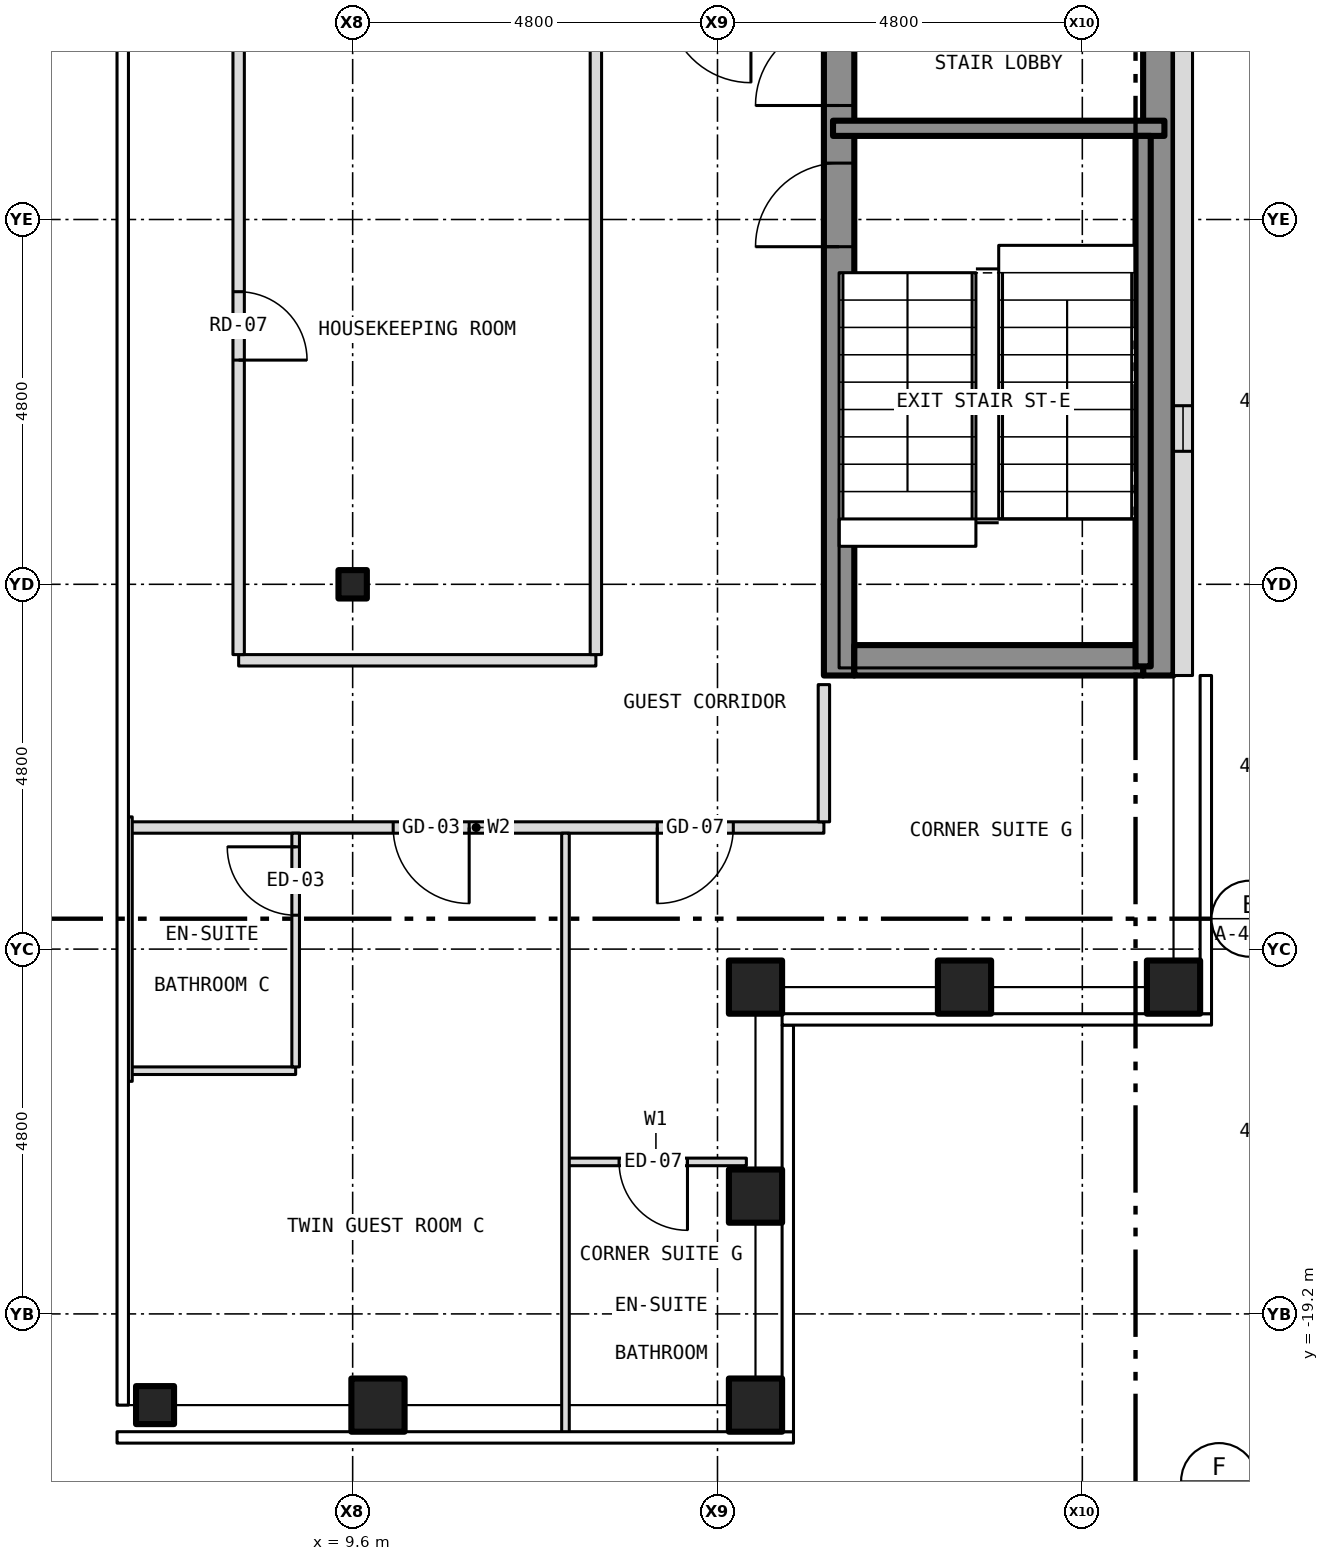
"""IFC4 building model, lengths in metres.
Left out: names, types, materials, properties, quantities, classifications, styles, units other than length and angle.
Written with IfcOpenShell. Run it as: python <this file> out.ifc"""

import sys

from ifc_helpers import new_model, si_unit, direction, frame, frame_2d, origin, origin_2d, place, context, subcontext, project, spatial, rectangle, hollow_rectangle, i_section, extrude, element, fill, save


model = new_model("IFC4")
c1 = context("Model", 3, precision=1e-05, world=origin(), true_north=direction((0.0, 1.0)))
c2 = subcontext(c1, "Body", "Model", "MODEL_VIEW")
j1 = project(units=[si_unit("LENGTHUNIT", "METRE"), si_unit("PLANEANGLEUNIT", "RADIAN")], contexts=[c1])
p1 = place(None, origin())
s1 = spatial("IfcSite", under=j1, at=p1, CompositionType="ELEMENT")
p2 = place(p1, origin())
s2 = spatial("IfcBuilding", under=s1, at=p2, CompositionType="ELEMENT")
p3 = place(p2, frame((0.0, 0.0, 226.0)))
s3 = spatial("IfcBuildingStorey", under=s2, at=p3, CompositionType="ELEMENT", Elevation=226.0)
for number, where, z_axis, x_axis in (
    (1, (9.933, -20.4, -0.15), (0.0, 0.0, 1.0), (1.0, 0.0, 0.0)),
    (2, (14.9, -20.4, -0.15), (0.0, 0.0, 1.0), (1.0, 0.0, 0.0)),
    (3, (20.4, -14.9, -0.15), (0.0, 0.0, 1.0), (1.0, 0.0, 0.0)),
    (4, (14.9, -14.9, -0.15), (0.0, 0.0, 1.0), (1.0, 0.0, 0.0)),
    (5, (14.9, -17.65, -0.15), (0.0, 0.0, 1.0), (1.0, 0.0, 0.0)),
    (6, (17.65, -14.9, -0.15), (0.0, 0.0, 1.0), (1.0, 0.0, 0.0)),
):
    element("IfcColumn", number, at=place(p3, frame(where, z_axis=z_axis, x_axis=x_axis)), inside=s3, PredefinedType="COLUMN", context=c2, shape_type="SweptSolid", body=[
        extrude(hollow_rectangle(XDim=0.7, YDim=0.7, WallThickness=0.04, at=origin_2d()), origin(), (0.0, 0.0, 1.0), 3.5),
    ])
p4 = place(p3, frame((7.0, -20.4, -0.15), z_axis=(0.0, 0.0, 1.0), x_axis=(1.0, 0.0, 0.0)))
e7 = element("IfcColumn", 7, at=p4, inside=s3, PredefinedType="COLUMN", context=c2, shape_type="SweptSolid", body=[
    extrude(hollow_rectangle(XDim=0.5, YDim=0.5, WallThickness=0.03, at=origin_2d()), origin(), (0.0, 0.0, 1.0), 3.5),
])
p5 = place(p3, frame((9.6, -9.6, -0.15), z_axis=(0.0, 0.0, 1.0), x_axis=(1.0, 0.0, 0.0)))
e8 = element("IfcColumn", 8, at=p5, inside=s3, PredefinedType="COLUMN", context=c2, shape_type="SweptSolid", body=[
    extrude(i_section(OverallWidth=0.373, OverallDepth=0.373, WebThickness=0.016, FlangeThickness=0.026, at=origin_2d()), origin(), (0.0, 0.0, 1.0), 3.5),
])
p6 = place(p3, frame((16.0, -10.8, 0.0), z_axis=(0.0, 0.0, 1.0), x_axis=(0.0, 1.0, 0.0)))
e9 = element("IfcWall", 9, at=p6, inside=s3, PredefinedType="SHEAR", context=c2, shape_type="SweptSolid", body=[
    extrude(rectangle(XDim=21.6, YDim=0.4, at=frame_2d((10.8, 0.0))), origin(), (0.0, 0.0, 1.0), 3.25),
])
p7 = place(p6, frame((9.4, 0.0, 0.0)))
e10 = element("IfcOpeningElement", 10, at=p7, cuts=e9, PredefinedType="OPENING", context=c2, shape_type="SweptSolid", body=[
    extrude(rectangle(XDim=1.1, YDim=2.1, at=frame_2d((0.55, 1.05))), frame((0.0, 0.212, 0.0), z_axis=(0.0, -1.0, 0.0), x_axis=(1.0, 0.0, 0.0)), (0.0, 0.0, 1.0), 0.424),
])
p8 = place(p6, frame((11.5, 0.0, 0.0)))
e11 = element("IfcOpeningElement", 11, at=p8, cuts=e9, PredefinedType="OPENING", context=c2, shape_type="SweptSolid", body=[
    extrude(rectangle(XDim=1.1, YDim=2.1, at=frame_2d((0.55, 1.05))), frame((0.0, 0.212, 0.0), z_axis=(0.0, -1.0, 0.0), x_axis=(1.0, 0.0, 0.0)), (0.0, 0.0, 1.0), 0.424),
])
p9 = place(p6, frame((13.6, 0.0, 0.0)))
e12 = element("IfcOpeningElement", 12, at=p9, cuts=e9, PredefinedType="OPENING", context=c2, shape_type="SweptSolid", body=[
    extrude(rectangle(XDim=1.1, YDim=2.1, at=frame_2d((0.55, 1.05))), frame((0.0, 0.212, 0.0), z_axis=(0.0, -1.0, 0.0), x_axis=(1.0, 0.0, 0.0)), (0.0, 0.0, 1.0), 0.424),
])
p10 = place(p6, frame((15.7, 0.0, 0.0)))
e13 = element("IfcOpeningElement", 13, at=p10, cuts=e9, PredefinedType="OPENING", context=c2, shape_type="SweptSolid", body=[
    extrude(rectangle(XDim=1.1, YDim=2.1, at=frame_2d((0.55, 1.05))), frame((0.0, 0.212, 0.0), z_axis=(0.0, -1.0, 0.0), x_axis=(1.0, 0.0, 0.0)), (0.0, 0.0, 1.0), 0.424),
])
p11 = place(p6, frame((17.8, 0.0, 0.0)))
e14 = element("IfcOpeningElement", 14, at=p11, cuts=e9, PredefinedType="OPENING", context=c2, shape_type="SweptSolid", body=[
    extrude(rectangle(XDim=1.1, YDim=2.1, at=frame_2d((0.55, 1.05))), frame((0.0, 0.212, 0.0), z_axis=(0.0, -1.0, 0.0), x_axis=(1.0, 0.0, 0.0)), (0.0, 0.0, 1.0), 0.424),
])
p12 = place(p6, frame((5.642, 0.0, 0.0)))
e15 = element("IfcOpeningElement", 15, at=p12, cuts=e9, PredefinedType="OPENING", context=c2, shape_type="SweptSolid", body=[
    extrude(rectangle(XDim=1.1, YDim=2.1, at=frame_2d((0.55, 1.05))), frame((0.0, 0.212, 0.0), z_axis=(0.0, -1.0, 0.0), x_axis=(1.0, 0.0, 0.0)), (0.0, 0.0, 1.0), 0.424),
])
p13 = place(p6, frame((7.5, 0.0, 0.0)))
e16 = element("IfcOpeningElement", 16, at=p13, cuts=e9, PredefinedType="OPENING", context=c2, shape_type="SweptSolid", body=[
    extrude(rectangle(XDim=1.1, YDim=2.1, at=frame_2d((0.55, 1.05))), frame((0.0, 0.212, 0.0), z_axis=(0.0, -1.0, 0.0), x_axis=(1.0, 0.0, 0.0)), (0.0, 0.0, 1.0), 0.424),
])
p14 = place(p6, frame((20.0, 0.0, 0.0)))
e17 = element("IfcOpeningElement", 17, at=p14, cuts=e9, PredefinedType="OPENING", context=c2, shape_type="SweptSolid", body=[
    extrude(rectangle(XDim=0.9, YDim=2.1, at=frame_2d((0.45, 1.05))), frame((0.0, 0.212, 0.0), z_axis=(0.0, -1.0, 0.0), x_axis=(1.0, 0.0, 0.0)), (0.0, 0.0, 1.0), 0.424),
])
p15 = place(p3, frame((20.2, -10.8, 0.0), z_axis=(0.0, 0.0, 1.0), x_axis=(0.0, 1.0, 0.0)))
e18 = element("IfcWall", 18, at=p15, inside=s3, PredefinedType="SHEAR", context=c2, shape_type="SweptSolid", body=[
    extrude(rectangle(XDim=21.6, YDim=0.4, at=frame_2d((10.8, 0.0))), origin(), (0.0, 0.0, 1.0), 3.25),
])
p16 = place(p3, frame((16.2, -10.6, 0.0), z_axis=(0.0, 0.0, 1.0), x_axis=(1.0, 0.0, 0.0)))
e19 = element("IfcWall", 19, at=p16, inside=s3, PredefinedType="SHEAR", context=c2, shape_type="SweptSolid", body=[
    extrude(rectangle(XDim=3.8, YDim=0.4, at=frame_2d((1.9, 0.0))), origin(), (0.0, 0.0, 1.0), 3.25),
])
p17 = place(p3, frame((20.525, -10.8, 0.0), z_axis=(0.0, 0.0, 1.0), x_axis=(0.0, 1.0, 0.0)))
e20 = element("IfcWall", 20, at=p17, inside=s3, PredefinedType="SOLIDWALL", context=c2, shape_type="SweptSolid", body=[
    extrude(rectangle(XDim=21.6, YDim=0.25, at=frame_2d((10.8, 0.0))), origin(), (0.0, 0.0, 1.0), 3.5),
])
p18 = place(p17, frame((2.95, 0.0, 1.0)))
e21 = element("IfcOpeningElement", 21, at=p18, cuts=e20, PredefinedType="OPENING", context=c2, shape_type="SweptSolid", body=[
    extrude(rectangle(XDim=0.6, YDim=1.5, at=frame_2d((0.3, 0.75))), frame((0.0, 0.137, 0.0), z_axis=(0.0, -1.0, 0.0), x_axis=(1.0, 0.0, 0.0)), (0.0, 0.0, 1.0), 0.274),
])
p19 = place(p3, frame((12.4, -17.2, 0.0), z_axis=(0.0, 0.0, 1.0), x_axis=(1.0, 0.0, 0.0)))
e22 = element("IfcWall", 22, at=p19, inside=s3, PredefinedType="PARTITIONING", context=c2, shape_type="SweptSolid", body=[
    extrude(rectangle(XDim=2.38, YDim=0.1, at=frame_2d((1.19, 0.0))), origin(), (0.0, 0.0, 1.0), 3.35),
])
p20 = place(p19, frame((0.705, 0.0, 0.0)))
e23 = element("IfcOpeningElement", 23, at=p20, cuts=e22, PredefinedType="OPENING", context=c2, shape_type="SweptSolid", body=[
    extrude(rectangle(XDim=0.9, YDim=2.1, at=frame_2d((0.45, 1.05))), frame((0.0, 0.062, 0.0), z_axis=(0.0, -1.0, 0.0), x_axis=(1.0, 0.0, 0.0)), (0.0, 0.0, 1.0), 0.124),
])
p21 = place(p3, frame((6.65, -16.0, 0.0), z_axis=(0.0, 0.0, 1.0), x_axis=(1.0, 0.0, 0.0)))
e24 = element("IfcWall", 24, at=p21, inside=s3, PredefinedType="PARTITIONING", context=c2, shape_type="SweptSolid", body=[
    extrude(rectangle(XDim=2.2, YDim=0.1, at=frame_2d((1.1, 0.0))), origin(), (0.0, 0.0, 1.0), 3.35),
])
p22 = place(p3, frame((6.65, -12.8, 0.0), z_axis=(0.0, 0.0, 1.0), x_axis=(1.0, 0.0, 0.0)))
e25 = element("IfcWall", 25, at=p22, inside=s3, PredefinedType="PARTITIONING", context=c2, shape_type="SweptSolid", body=[
    extrude(rectangle(XDim=9.15, YDim=0.15, at=frame_2d((4.575, 0.0))), origin(), (0.0, 0.0, 1.0), 3.35),
])
p23 = place(p22, frame((3.483, 0.0, 0.0)))
e26 = element("IfcOpeningElement", 26, at=p23, cuts=e25, PredefinedType="OPENING", context=c2, shape_type="SweptSolid", body=[
    extrude(rectangle(XDim=1.0, YDim=2.1, at=frame_2d((0.5, 1.05))), frame((0.0, 0.087, 0.0), z_axis=(0.0, -1.0, 0.0), x_axis=(1.0, 0.0, 0.0)), (0.0, 0.0, 1.0), 0.174),
])
p24 = place(p22, frame((6.958, 0.0, 0.0)))
e27 = element("IfcOpeningElement", 27, at=p24, cuts=e25, PredefinedType="OPENING", context=c2, shape_type="SweptSolid", body=[
    extrude(rectangle(XDim=1.0, YDim=2.1, at=frame_2d((0.5, 1.05))), frame((0.0, 0.087, 0.0), z_axis=(0.0, -1.0, 0.0), x_axis=(1.0, 0.0, 0.0)), (0.0, 0.0, 1.0), 0.174),
])
p25 = place(p3, frame((8.1, -10.6, 0.0), z_axis=(0.0, 0.0, 1.0), x_axis=(1.0, 0.0, 0.0)))
e28 = element("IfcWall", 28, at=p25, inside=s3, PredefinedType="PARTITIONING", context=c2, shape_type="SweptSolid", body=[
    extrude(rectangle(XDim=4.7, YDim=0.15, at=frame_2d((2.35, 0.0))), origin(), (0.0, 0.0, 1.0), 3.35),
])
p26 = place(p3, frame((15.92, -3.6, 0.0), z_axis=(0.0, 0.0, 1.0), x_axis=(1.0, 0.0, 0.0)))
e29 = element("IfcWall", 29, at=p26, inside=s3, PredefinedType="SHEAR", context=c2, shape_type="SweptSolid", body=[
    extrude(rectangle(XDim=4.36, YDim=0.2, at=frame_2d((2.18, 0.0))), origin(), (0.0, 0.0, 1.0), 3.25),
])
p27 = place(p3, frame((6.65, -16.14, 0.0), z_axis=(0.0, 0.0, 1.0), x_axis=(0.0, 1.0, 0.0)))
e30 = element("IfcWall", 30, at=p27, inside=s3, PredefinedType="PARTITIONING", context=c2, shape_type="SweptSolid", body=[
    extrude(rectangle(XDim=3.48, YDim=0.1, at=frame_2d((1.74, 0.0))), origin(), (0.0, 0.0, 1.0), 3.35),
])
p28 = place(p3, frame((8.1, -10.525, 0.0), z_axis=(0.0, 0.0, 1.0), x_axis=(0.0, 1.0, 0.0)))
e31 = element("IfcWall", 31, at=p28, inside=s3, PredefinedType="PARTITIONING", context=c2, shape_type="SweptSolid", body=[
    extrude(rectangle(XDim=8.65, YDim=0.15, at=frame_2d((4.325, 0.0))), origin(), (0.0, 0.0, 1.0), 3.35),
])
p29 = place(p28, frame((3.875, 0.0, 0.0)))
e32 = element("IfcOpeningElement", 32, at=p29, cuts=e31, PredefinedType="OPENING", context=c2, shape_type="SweptSolid", body=[
    extrude(rectangle(XDim=0.9, YDim=2.1, at=frame_2d((0.45, 1.05))), frame((0.0, 0.087, 0.0), z_axis=(0.0, -1.0, 0.0), x_axis=(1.0, 0.0, 0.0)), (0.0, 0.0, 1.0), 0.174),
])
p30 = place(p3, frame((8.85, -15.95, 0.0), z_axis=(0.0, 0.0, 1.0), x_axis=(0.0, 1.0, 0.0)))
e33 = element("IfcWall", 33, at=p30, inside=s3, PredefinedType="PARTITIONING", context=c2, shape_type="SweptSolid", body=[
    extrude(rectangle(XDim=3.075, YDim=0.1, at=frame_2d((1.538, 0.0))), origin(), (0.0, 0.0, 1.0), 3.35),
])
p31 = place(p30, frame((1.996, 0.0, 0.0)))
e34 = element("IfcOpeningElement", 34, at=p31, cuts=e33, PredefinedType="OPENING", context=c2, shape_type="SweptSolid", body=[
    extrude(rectangle(XDim=0.9, YDim=2.1, at=frame_2d((0.45, 1.05))), frame((0.0, 0.062, 0.0), z_axis=(0.0, -1.0, 0.0), x_axis=(1.0, 0.0, 0.0)), (0.0, 0.0, 1.0), 0.124),
])
p32 = place(p3, frame((12.4, -20.78, 0.0), z_axis=(0.0, 0.0, 1.0), x_axis=(0.0, 1.0, 0.0)))
e35 = element("IfcWall", 35, at=p32, inside=s3, PredefinedType="PARTITIONING", context=c2, shape_type="SweptSolid", body=[
    extrude(rectangle(XDim=7.905, YDim=0.1, at=frame_2d((3.953, 0.0))), origin(), (0.0, 0.0, 1.0), 3.35),
])
p33 = place(p3, frame((12.8, -10.525, 0.0), z_axis=(0.0, 0.0, 1.0), x_axis=(0.0, 1.0, 0.0)))
e36 = element("IfcWall", 36, at=p33, inside=s3, PredefinedType="PARTITIONING", context=c2, shape_type="SweptSolid", body=[
    extrude(rectangle(XDim=8.525, YDim=0.15, at=frame_2d((4.262, 0.0))), origin(), (0.0, 0.0, 1.0), 3.35),
])
p34 = place(p3, frame((15.8, -12.725, 0.0), z_axis=(0.0, 0.0, 1.0), x_axis=(0.0, 1.0, 0.0)))
e37 = element("IfcWall", 37, at=p34, inside=s3, PredefinedType="PARTITIONING", context=c2, shape_type="SweptSolid", body=[
    extrude(rectangle(XDim=1.805, YDim=0.15, at=frame_2d((0.903, 0.0))), origin(), (0.0, 0.0, 1.0), 3.35),
])
p35 = place(p3, frame((20.0, -10.68, 0.0), z_axis=(0.0, 0.0, 1.0), x_axis=(0.0, 1.0, 0.0)))
e38 = element("IfcWall", 38, at=p35, inside=s3, PredefinedType="SHEAR", context=c2, shape_type="SweptSolid", body=[
    extrude(rectangle(XDim=6.98, YDim=0.2, at=frame_2d((3.49, 0.0))), origin(), (0.0, 0.0, 1.0), 3.25),
])
p36 = place(p18, origin())
e39 = element("IfcWindow", 39, at=p36, inside=s3, PartitioningType="SINGLE_PANEL", PredefinedType="WINDOW", context=c2, shape_type="SweptSolid", body=[
    extrude(rectangle(XDim=0.6, YDim=1.5, at=frame_2d((0.3, 0.75))), frame((0.0, -0.035, 0.0), z_axis=(0.0, -1.0, 0.0), x_axis=(1.0, 0.0, 0.0)), (0.0, 0.0, 1.0), 0.06),
])
fill(e21, e39)
p37 = place(p12, origin())
e40 = element("IfcDoor", 40, at=p37, inside=s3, OperationType="SINGLE_SWING_LEFT", PredefinedType="DOOR", context=c2, shape_type="SweptSolid", body=[
    extrude(rectangle(XDim=1.1, YDim=2.1, at=frame_2d((0.55, 1.05))), frame((0.0, 0.025, 0.0), z_axis=(0.0, -1.0, 0.0), x_axis=(1.0, 0.0, 0.0)), (0.0, 0.0, 1.0), 0.05),
])
fill(e15, e40)
p38 = place(p13, origin())
e41 = element("IfcDoor", 41, at=p38, inside=s3, OperationType="SINGLE_SWING_LEFT", PredefinedType="DOOR", context=c2, shape_type="SweptSolid", body=[
    extrude(rectangle(XDim=1.1, YDim=2.1, at=frame_2d((0.55, 1.05))), frame((0.0, 0.025, 0.0), z_axis=(0.0, -1.0, 0.0), x_axis=(1.0, 0.0, 0.0)), (0.0, 0.0, 1.0), 0.05),
])
fill(e16, e41)
p39 = place(p23, origin())
e42 = element("IfcDoor", 42, at=p39, inside=s3, OperationType="SINGLE_SWING_RIGHT", PredefinedType="DOOR", context=c2, shape_type="SweptSolid", body=[
    extrude(rectangle(XDim=1.0, YDim=2.1, at=frame_2d((0.5, 1.05))), frame((0.0, 0.025, 0.0), z_axis=(0.0, -1.0, 0.0), x_axis=(1.0, 0.0, 0.0)), (0.0, 0.0, 1.0), 0.05),
])
fill(e26, e42)
p40 = place(p31, origin())
e43 = element("IfcDoor", 43, at=p40, inside=s3, OperationType="SINGLE_SWING_RIGHT", PredefinedType="DOOR", context=c2, shape_type="SweptSolid", body=[
    extrude(rectangle(XDim=0.9, YDim=2.1, at=frame_2d((0.45, 1.05))), frame((0.0, 0.025, 0.0), z_axis=(0.0, -1.0, 0.0), x_axis=(1.0, 0.0, 0.0)), (0.0, 0.0, 1.0), 0.05),
])
fill(e34, e43)
p41 = place(p20, origin())
e44 = element("IfcDoor", 44, at=p41, inside=s3, OperationType="SINGLE_SWING_RIGHT", PredefinedType="DOOR", context=c2, shape_type="SweptSolid", body=[
    extrude(rectangle(XDim=0.9, YDim=2.1, at=frame_2d((0.45, 1.05))), frame((0.0, 0.025, 0.0), z_axis=(0.0, -1.0, 0.0), x_axis=(1.0, 0.0, 0.0)), (0.0, 0.0, 1.0), 0.05),
])
fill(e23, e44)
p42 = place(p24, origin())
e45 = element("IfcDoor", 45, at=p42, inside=s3, OperationType="SINGLE_SWING_LEFT", PredefinedType="DOOR", context=c2, shape_type="SweptSolid", body=[
    extrude(rectangle(XDim=1.0, YDim=2.1, at=frame_2d((0.5, 1.05))), frame((0.0, 0.025, 0.0), z_axis=(0.0, -1.0, 0.0), x_axis=(1.0, 0.0, 0.0)), (0.0, 0.0, 1.0), 0.05),
])
fill(e27, e45)
p43 = place(p29, origin())
e46 = element("IfcDoor", 46, at=p43, inside=s3, OperationType="SINGLE_SWING_LEFT", PredefinedType="DOOR", context=c2, shape_type="SweptSolid", body=[
    extrude(rectangle(XDim=0.9, YDim=2.1, at=frame_2d((0.45, 1.05))), frame((0.0, 0.025, 0.0), z_axis=(0.0, -1.0, 0.0), x_axis=(1.0, 0.0, 0.0)), (0.0, 0.0, 1.0), 0.05),
])
fill(e32, e46)
save(model, sys.argv[1])
